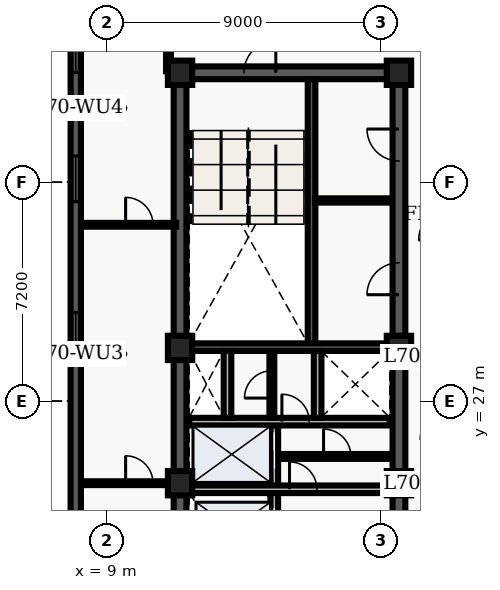
"""IFC4 building model, lengths in metres.
Left out: names, types, materials, properties, quantities, classifications, styles, units other than length and angle.
Written with IfcOpenShell. Run it as: python <this file> out.ifc"""

import sys

from ifc_helpers import new_model, entity, si_unit, converted_unit, direction, frame, origin_with_axes, origin_2d_with_axis, place, context, subcontext, project, spatial, polyline, rectangle, outline, extrude, element, fill, save


model = new_model("IFC4")
c1 = context("Model", 3, precision=1e-05, world=origin_with_axes(), true_north=direction((0.0, 1.0)))
c2 = subcontext(c1, "Body", "Model", "MODEL_VIEW")
j1 = project(units=[si_unit("LENGTHUNIT", "METRE"), converted_unit("PLANEANGLEUNIT", "DEGREE", entity("IfcPlaneAngleMeasure", 0.017), si_unit("PLANEANGLEUNIT", "RADIAN"), dimensions=[0, 0, 0, 0, 0, 0, 0])], contexts=[c1])
p1 = place(None, origin_with_axes())
s1 = spatial("IfcSite", under=j1, at=p1, CompositionType="ELEMENT")
p2 = place(p1, origin_with_axes())
s2 = spatial("IfcBuilding", under=s1, at=p2, CompositionType="ELEMENT")
p3 = place(p2, frame((0.0, 0.0, 284.1), z_axis=(0.0, 0.0, 1.0), x_axis=(1.0, 0.0, 0.0)))
s3 = spatial("IfcBuildingStorey", under=s2, at=p3, CompositionType="ELEMENT", Elevation=284.1)
p4 = place(p3, frame((11.4, 10.8, 0.0), z_axis=(0.0, 0.0, 1.0), x_axis=(0.0, 1.0, 0.0)))
e1 = element("IfcWall", 1, at=p4, inside=s3, PredefinedType="SHEAR", context=c2, shape_type="SweptSolid", body=[
    extrude(outline(polyline([(0.0, -0.21), (27.0, -0.21), (27.0, 0.21), (0.0, 0.21), (0.0, -0.21)])), origin_with_axes(), (0.0, 0.0, 1.0), 3.6),
])
p5 = place(p3, frame((11.4, 37.8, 0.0), z_axis=(0.0, 0.0, 1.0), x_axis=(1.0, 0.0, 0.0)))
e2 = element("IfcWall", 2, at=p5, inside=s3, PredefinedType="SHEAR", context=c2, shape_type="SweptSolid", body=[
    extrude(outline(polyline([(0.0, -0.21), (7.2, -0.21), (7.2, 0.21), (0.0, 0.21), (0.0, -0.21)])), origin_with_axes(), (0.0, 0.0, 1.0), 3.6),
])
p6 = place(p5, frame((2.625, 0.0, 0.0), z_axis=(0.0, 0.0, 1.0), x_axis=(1.0, 0.0, 0.0)))
e3 = element("IfcOpeningElement", 3, at=p6, cuts=e2, PredefinedType="OPENING", context=c2, shape_type="SweptSolid", body=[
    extrude(rectangle(XDim=1.05, YDim=0.44, at=origin_2d_with_axis()), origin_with_axes(), (0.0, 0.0, 1.0), 2.15),
])
p7 = place(p3, frame((18.6, 10.8, 0.0), z_axis=(0.0, 0.0, 1.0), x_axis=(0.0, 1.0, 0.0)))
e4 = element("IfcWall", 4, at=p7, inside=s3, PredefinedType="SHEAR", context=c2, shape_type="SweptSolid", body=[
    extrude(outline(polyline([(0.0, -0.21), (13.5, -0.21), (13.5, 0.21), (0.0, 0.21), (0.0, -0.21)])), origin_with_axes(), (0.0, 0.0, 1.0), 3.6),
])
p8 = place(p7, frame((1.3, 0.0, 0.0), z_axis=(0.0, 0.0, 1.0), x_axis=(1.0, 0.0, 0.0)))
e5 = element("IfcOpeningElement", 5, at=p8, cuts=e4, PredefinedType="OPENING", context=c2, shape_type="SweptSolid", body=[
    extrude(rectangle(XDim=1.1, YDim=0.44, at=origin_2d_with_axis()), origin_with_axes(), (0.0, 0.0, 1.0), 2.15),
])
p9 = place(p7, frame((3.4, 0.0, 0.0), z_axis=(0.0, 0.0, 1.0), x_axis=(1.0, 0.0, 0.0)))
e6 = element("IfcOpeningElement", 6, at=p9, cuts=e4, PredefinedType="OPENING", context=c2, shape_type="SweptSolid", body=[
    extrude(rectangle(XDim=1.1, YDim=0.44, at=origin_2d_with_axis()), origin_with_axes(), (0.0, 0.0, 1.0), 2.15),
])
p10 = place(p7, frame((11.125, 0.0, 0.0), z_axis=(0.0, 0.0, 1.0), x_axis=(1.0, 0.0, 0.0)))
e7 = element("IfcOpeningElement", 7, at=p10, cuts=e4, PredefinedType="OPENING", context=c2, shape_type="SweptSolid", body=[
    extrude(rectangle(XDim=1.05, YDim=0.44, at=origin_2d_with_axis()), origin_with_axes(), (0.0, 0.0, 1.0), 2.15),
])
p11 = place(p7, frame((6.675, 0.0, 0.0), z_axis=(0.0, 0.0, 1.0), x_axis=(1.0, 0.0, 0.0)))
e8 = element("IfcOpeningElement", 8, at=p11, cuts=e4, PredefinedType="OPENING", context=c2, shape_type="SweptSolid", body=[
    extrude(rectangle(XDim=0.95, YDim=0.44, at=origin_2d_with_axis()), origin_with_axes(), (0.0, 0.0, 1.0), 2.15),
])
p12 = place(p3, frame((18.6, 24.3, 0.0), z_axis=(0.0, 0.0, 1.0), x_axis=(0.0, 1.0, 0.0)))
e9 = element("IfcWall", 9, at=p12, inside=s3, PredefinedType="SHEAR", context=c2, shape_type="SweptSolid", body=[
    extrude(outline(polyline([(0.0, -0.21), (13.5, -0.21), (13.5, 0.21), (0.0, 0.21), (0.0, -0.21)])), origin_with_axes(), (0.0, 0.0, 1.0), 3.6),
])
p13 = place(p12, frame((6.725, 0.0, 0.0), z_axis=(0.0, 0.0, 1.0), x_axis=(1.0, 0.0, 0.0)))
e10 = element("IfcOpeningElement", 10, at=p13, cuts=e9, PredefinedType="OPENING", context=c2, shape_type="SweptSolid", body=[
    extrude(rectangle(XDim=1.05, YDim=0.44, at=origin_2d_with_axis()), origin_with_axes(), (0.0, 0.0, 1.0), 2.15),
])
p14 = place(p12, frame((11.125, 0.0, 0.0), z_axis=(0.0, 0.0, 1.0), x_axis=(1.0, 0.0, 0.0)))
e11 = element("IfcOpeningElement", 11, at=p14, cuts=e9, PredefinedType="OPENING", context=c2, shape_type="SweptSolid", body=[
    extrude(rectangle(XDim=1.05, YDim=0.44, at=origin_2d_with_axis()), origin_with_axes(), (0.0, 0.0, 1.0), 2.15),
])
p15 = place(p3, frame((15.725, 28.9, 0.0), z_axis=(0.0, 0.0, 1.0), x_axis=(0.0, 1.0, 0.0)))
e12 = element("IfcWall", 12, at=p15, inside=s3, PredefinedType="SHEAR", context=c2, shape_type="SweptSolid", body=[
    extrude(outline(polyline([(0.0, -0.125), (8.69, -0.125), (8.69, 0.125), (0.0, 0.125), (0.0, -0.125)])), origin_with_axes(), (0.0, 0.0, 1.0), 3.6),
])
p16 = place(p3, frame((11.61, 28.775, 0.0), z_axis=(0.0, 0.0, 1.0), x_axis=(1.0, 0.0, 0.0)))
e13 = element("IfcWall", 13, at=p16, inside=s3, PredefinedType="SHEAR", context=c2, shape_type="SweptSolid", body=[
    extrude(outline(polyline([(0.0, -0.125), (6.78, -0.125), (6.78, 0.125), (0.0, 0.125), (0.0, -0.125)])), origin_with_axes(), (0.0, 0.0, 1.0), 3.6),
])
p17 = place(p3, frame((14.5, 19.95, 0.0), z_axis=(0.0, 0.0, 1.0), x_axis=(0.0, 1.0, 0.0)))
e14 = element("IfcWall", 14, at=p17, inside=s3, PredefinedType="SOLIDWALL", context=c2, shape_type="SweptSolid", body=[
    extrude(outline(polyline([(0.0, -0.125), (6.25, -0.125), (6.25, 0.125), (0.0, 0.125), (0.0, -0.125)])), origin_with_axes(), (0.0, 0.0, 1.0), 2.64),
])
p18 = place(p17, frame((1.025, 0.0, 0.0), z_axis=(0.0, 0.0, 1.0), x_axis=(1.0, 0.0, 0.0)))
e15 = element("IfcOpeningElement", 15, at=p18, cuts=e14, PredefinedType="OPENING", context=c2, shape_type="SweptSolid", body=[
    extrude(rectangle(XDim=1.1, YDim=0.27, at=origin_2d_with_axis()), origin_with_axes(), (0.0, 0.0, 1.0), 2.15),
])
p19 = place(p17, frame((2.975, 0.0, 0.0), z_axis=(0.0, 0.0, 1.0), x_axis=(1.0, 0.0, 0.0)))
e16 = element("IfcOpeningElement", 16, at=p19, cuts=e14, PredefinedType="OPENING", context=c2, shape_type="SweptSolid", body=[
    extrude(rectangle(XDim=1.1, YDim=0.27, at=origin_2d_with_axis()), origin_with_axes(), (0.0, 0.0, 1.0), 2.15),
])
p20 = place(p17, frame((5.425, 0.0, 0.0), z_axis=(0.0, 0.0, 1.0), x_axis=(1.0, 0.0, 0.0)))
e17 = element("IfcOpeningElement", 17, at=p20, cuts=e14, PredefinedType="OPENING", context=c2, shape_type="SweptSolid", body=[
    extrude(rectangle(XDim=1.2, YDim=0.27, at=origin_2d_with_axis()), origin_with_axes(), (0.0, 0.0, 1.0), 2.15),
])
p21 = place(p3, frame((11.7, 24.1, 0.0), z_axis=(0.0, 0.0, 1.0), x_axis=(1.0, 0.0, 0.0)))
e18 = element("IfcWall", 18, at=p21, inside=s3, PredefinedType="SOLIDWALL", context=c2, shape_type="SweptSolid", body=[
    extrude(outline(polyline([(0.0, -0.125), (6.6, -0.125), (6.6, 0.125), (0.0, 0.125), (0.0, -0.125)])), origin_with_axes(), (0.0, 0.0, 1.0), 2.64),
])
p22 = place(p21, frame((3.75, 0.0, 0.0), z_axis=(0.0, 0.0, 1.0), x_axis=(1.0, 0.0, 0.0)))
e19 = element("IfcOpeningElement", 19, at=p22, cuts=e18, PredefinedType="OPENING", context=c2, shape_type="SweptSolid", body=[
    extrude(rectangle(XDim=0.9, YDim=0.27, at=origin_2d_with_axis()), origin_with_axes(), (0.0, 0.0, 1.0), 2.15),
])
p23 = place(p3, frame((11.7, 26.325, 0.0), z_axis=(0.0, 0.0, 1.0), x_axis=(1.0, 0.0, 0.0)))
e20 = element("IfcWall", 20, at=p23, inside=s3, PredefinedType="SOLIDWALL", context=c2, shape_type="SweptSolid", body=[
    extrude(outline(polyline([(0.0, -0.125), (6.6, -0.125), (6.6, 0.125), (0.0, 0.125), (0.0, -0.125)])), origin_with_axes(), (0.0, 0.0, 1.0), 2.64),
])
p24 = place(p23, frame((3.5, 0.0, 0.0), z_axis=(0.0, 0.0, 1.0), x_axis=(1.0, 0.0, 0.0)))
e21 = element("IfcOpeningElement", 21, at=p24, cuts=e20, PredefinedType="OPENING", context=c2, shape_type="SweptSolid", body=[
    extrude(rectangle(XDim=0.9, YDim=0.27, at=origin_2d_with_axis()), origin_with_axes(), (0.0, 0.0, 1.0), 2.15),
])
for number, where, z_axis, x_axis in (
    (22, (12.96, 26.45, 0.0), (0.0, 0.0, 1.0), (0.0, 1.0, 0.0)),
    (23, (15.925, 26.45, 0.0), (0.0, 0.0, 1.0), (0.0, 1.0, 0.0)),
):
    element("IfcWall", number, at=place(p3, frame(where, z_axis=z_axis, x_axis=x_axis)), inside=s3, PredefinedType="SOLIDWALL", context=c2, shape_type="SweptSolid", body=[
        extrude(outline(polyline([(0.0, -0.125), (2.2, -0.125), (2.2, 0.125), (0.0, 0.125), (0.0, -0.125)])), origin_with_axes(), (0.0, 0.0, 1.0), 2.64),
    ])
for number, where, z_axis, x_axis in (
    (24, (11.4, 24.3, 0.0), (0.0, 0.0, 1.0), (1.0, 0.0, 0.0)),
    (25, (11.4, 28.75, 0.0), (0.0, 0.0, 1.0), (1.0, 0.0, 0.0)),
    (26, (11.4, 37.8, 0.0), (0.0, 0.0, 1.0), (1.0, 0.0, 0.0)),
    (27, (18.6, 24.3, 0.0), (0.0, 0.0, 1.0), (1.0, 0.0, 0.0)),
    (28, (18.6, 28.75, 0.0), (0.0, 0.0, 1.0), (1.0, 0.0, 0.0)),
    (29, (18.6, 37.8, 0.0), (0.0, 0.0, 1.0), (1.0, 0.0, 0.0)),
):
    element("IfcColumn", number, at=place(p3, frame(where, z_axis=z_axis, x_axis=x_axis)), inside=s3, PredefinedType="COLUMN", context=c2, shape_type="SweptSolid", body=[
        extrude(rectangle(XDim=0.8, YDim=0.8, at=origin_2d_with_axis()), origin_with_axes(), (0.0, 0.0, 1.0), 3.9),
    ])
p25 = place(p3, frame((14.62, 25.18, 0.0), z_axis=(0.0, 0.0, 1.0), x_axis=(1.0, 0.0, 0.0)))
e30 = element("IfcWall", 30, at=p25, inside=s3, PredefinedType="PARTITIONING", context=c2, shape_type="SweptSolid", body=[
    extrude(outline(polyline([(0.0, -0.08), (3.68, -0.08), (3.68, 0.08), (0.0, 0.08), (0.0, -0.08)])), origin_with_axes(), (0.0, 0.0, 1.0), 2.64),
])
p26 = place(p25, frame((1.95, 0.0, 0.0), z_axis=(0.0, 0.0, 1.0), x_axis=(1.0, 0.0, 0.0)))
e31 = element("IfcOpeningElement", 31, at=p26, cuts=e30, PredefinedType="OPENING", context=c2, shape_type="SweptSolid", body=[
    extrude(rectangle(XDim=0.9, YDim=0.18, at=origin_2d_with_axis()), origin_with_axes(), (0.0, 0.0, 1.0), 2.15),
])
p27 = place(p3, frame((14.42, 26.45, 0.0), z_axis=(0.0, 0.0, 1.0), x_axis=(0.0, 1.0, 0.0)))
e32 = element("IfcWall", 32, at=p27, inside=s3, PredefinedType="PARTITIONING", context=c2, shape_type="SweptSolid", body=[
    extrude(outline(polyline([(0.0, -0.08), (2.2, -0.08), (2.2, 0.08), (0.0, 0.08), (0.0, -0.08)])), origin_with_axes(), (0.0, 0.0, 1.0), 2.64),
])
p28 = place(p27, frame((1.1, 0.0, 0.0), z_axis=(0.0, 0.0, 1.0), x_axis=(1.0, 0.0, 0.0)))
e33 = element("IfcOpeningElement", 33, at=p28, cuts=e32, PredefinedType="OPENING", context=c2, shape_type="SweptSolid", body=[
    extrude(rectangle(XDim=0.9, YDim=0.18, at=origin_2d_with_axis()), origin_with_axes(), (0.0, 0.0, 1.0), 2.15),
])
p29 = place(p3, frame((15.84, 33.6, 0.0), z_axis=(0.0, 0.0, 1.0), x_axis=(1.0, 0.0, 0.0)))
e34 = element("IfcWall", 34, at=p29, inside=s3, PredefinedType="PARTITIONING", context=c2, shape_type="SweptSolid", body=[
    extrude(outline(polyline([(0.0, -0.07), (2.46, -0.07), (2.46, 0.07), (0.0, 0.07), (0.0, -0.07)])), origin_with_axes(), (0.0, 0.0, 1.0), 2.64),
])
p30 = place(p3, frame((11.02, 37.85, 0.0), z_axis=(0.0, 0.0, 1.0), x_axis=(0.0, 1.0, 0.0)))
e35 = element("IfcWall", 35, at=p30, inside=s3, PredefinedType="PARTITIONING", context=c2, shape_type="SweptSolid", body=[
    extrude(outline(polyline([(0.0, -0.08), (2.65, -0.08), (2.65, 0.08), (0.0, 0.08), (0.0, -0.08)])), origin_with_axes(), (0.0, 0.0, 1.0), 2.64),
])
p31 = place(p30, frame((1.4, 0.0, 0.0), z_axis=(0.0, 0.0, 1.0), x_axis=(1.0, 0.0, 0.0)))
e36 = element("IfcOpeningElement", 36, at=p31, cuts=e35, PredefinedType="OPENING", context=c2, shape_type="SweptSolid", body=[
    extrude(rectangle(XDim=0.9, YDim=0.18, at=origin_2d_with_axis()), origin_with_axes(), (0.0, 0.0, 1.0), 2.15),
])
p32 = place(p3, frame((8.135, 24.3, 0.0), z_axis=(0.0, 0.0, 1.0), x_axis=(1.0, 0.0, 0.0)))
e37 = element("IfcWall", 37, at=p32, inside=s3, PredefinedType="PARTITIONING", context=c2, shape_type="SweptSolid", body=[
    extrude(outline(polyline([(0.0, -0.062), (3.135, -0.062), (3.135, 0.062), (0.0, 0.062), (0.0, -0.062)])), origin_with_axes(), (0.0, 0.0, 1.0), 2.64),
])
p33 = place(p32, frame((1.925, 0.0, 0.0), z_axis=(0.0, 0.0, 1.0), x_axis=(1.0, 0.0, 0.0)))
e38 = element("IfcOpeningElement", 38, at=p33, cuts=e37, PredefinedType="OPENING", context=c2, shape_type="SweptSolid", body=[
    extrude(rectangle(XDim=0.9, YDim=0.145, at=origin_2d_with_axis()), origin_with_axes(), (0.0, 0.0, 1.0), 2.15),
])
p34 = place(p3, frame((8.135, 32.8, 0.0), z_axis=(0.0, 0.0, 1.0), x_axis=(1.0, 0.0, 0.0)))
e39 = element("IfcWall", 39, at=p34, inside=s3, PredefinedType="PARTITIONING", context=c2, shape_type="SweptSolid", body=[
    extrude(outline(polyline([(0.0, -0.062), (3.135, -0.062), (3.135, 0.062), (0.0, 0.062), (0.0, -0.062)])), origin_with_axes(), (0.0, 0.0, 1.0), 2.64),
])
p35 = place(p34, frame((1.925, 0.0, 0.0), z_axis=(0.0, 0.0, 1.0), x_axis=(1.0, 0.0, 0.0)))
e40 = element("IfcOpeningElement", 40, at=p35, cuts=e39, PredefinedType="OPENING", context=c2, shape_type="SweptSolid", body=[
    extrude(rectangle(XDim=0.9, YDim=0.145, at=origin_2d_with_axis()), origin_with_axes(), (0.0, 0.0, 1.0), 2.15),
])
p36 = place(p3, frame((7.97, 2.74, 0.0), z_axis=(0.0, 0.0, 1.0), x_axis=(0.0, 1.0, 0.0)))
e41 = element("IfcWall", 41, at=p36, inside=s3, PredefinedType="SOLIDWALL", context=c2, shape_type="SweptSolid", body=[
    extrude(outline(polyline([(0.0, -0.17), (43.46, -0.17), (43.46, 0.17), (0.0, 0.17), (0.0, -0.17)])), origin_with_axes(), (0.0, 0.0, 1.0), 3.6),
])
p37 = place(p36, frame((2.948, 0.0, 0.45), z_axis=(0.0, 0.0, 1.0), x_axis=(1.0, 0.0, 0.0)))
e42 = element("IfcOpeningElement", 42, at=p37, cuts=e41, PredefinedType="OPENING", context=c2, shape_type="SweptSolid", body=[
    extrude(rectangle(XDim=1.5, YDim=0.36, at=origin_2d_with_axis()), origin_with_axes(), (0.0, 0.0, 1.0), 2.1),
])
p38 = place(p36, frame((7.643, 0.0, 0.45), z_axis=(0.0, 0.0, 1.0), x_axis=(1.0, 0.0, 0.0)))
e43 = element("IfcOpeningElement", 43, at=p38, cuts=e41, PredefinedType="OPENING", context=c2, shape_type="SweptSolid", body=[
    extrude(rectangle(XDim=1.5, YDim=0.36, at=origin_2d_with_axis()), origin_with_axes(), (0.0, 0.0, 1.0), 2.1),
])
p39 = place(p36, frame((17.034, 0.0, 0.45), z_axis=(0.0, 0.0, 1.0), x_axis=(1.0, 0.0, 0.0)))
e44 = element("IfcOpeningElement", 44, at=p39, cuts=e41, PredefinedType="OPENING", context=c2, shape_type="SweptSolid", body=[
    extrude(rectangle(XDim=1.5, YDim=0.36, at=origin_2d_with_axis()), origin_with_axes(), (0.0, 0.0, 1.0), 2.1),
])
p40 = place(p36, frame((26.426, 0.0, 0.45), z_axis=(0.0, 0.0, 1.0), x_axis=(1.0, 0.0, 0.0)))
e45 = element("IfcOpeningElement", 45, at=p40, cuts=e41, PredefinedType="OPENING", context=c2, shape_type="SweptSolid", body=[
    extrude(rectangle(XDim=1.5, YDim=0.36, at=origin_2d_with_axis()), origin_with_axes(), (0.0, 0.0, 1.0), 2.1),
])
p41 = place(p36, frame((31.571, 0.0, 0.45), z_axis=(0.0, 0.0, 1.0), x_axis=(1.0, 0.0, 0.0)))
e46 = element("IfcOpeningElement", 46, at=p41, cuts=e41, PredefinedType="OPENING", context=c2, shape_type="SweptSolid", body=[
    extrude(rectangle(XDim=1.5, YDim=0.36, at=origin_2d_with_axis()), origin_with_axes(), (0.0, 0.0, 1.0), 2.1),
])
p42 = place(p36, frame((35.817, 0.0, 0.45), z_axis=(0.0, 0.0, 1.0), x_axis=(1.0, 0.0, 0.0)))
e47 = element("IfcOpeningElement", 47, at=p42, cuts=e41, PredefinedType="OPENING", context=c2, shape_type="SweptSolid", body=[
    extrude(rectangle(XDim=1.5, YDim=0.36, at=origin_2d_with_axis()), origin_with_axes(), (0.0, 0.0, 1.0), 2.1),
])
p43 = place(p36, frame((40.512, 0.0, 0.45), z_axis=(0.0, 0.0, 1.0), x_axis=(1.0, 0.0, 0.0)))
e48 = element("IfcOpeningElement", 48, at=p43, cuts=e41, PredefinedType="OPENING", context=c2, shape_type="SweptSolid", body=[
    extrude(rectangle(XDim=1.5, YDim=0.36, at=origin_2d_with_axis()), origin_with_axes(), (0.0, 0.0, 1.0), 2.1),
])
p44 = place(p17, frame((2.975, 0.0, 0.0), z_axis=(0.0, 0.0, 1.0), x_axis=(1.0, 0.0, 0.0)))
e49 = element("IfcDoor", 49, at=p44, inside=s3, OperationType="SLIDING_TO_RIGHT", PredefinedType="DOOR", context=c2, shape_type="SweptSolid", body=[
    extrude(rectangle(XDim=1.1, YDim=0.09, at=origin_2d_with_axis()), origin_with_axes(), (0.0, 0.0, 1.0), 2.15),
])
fill(e16, e49)
p45 = place(p17, frame((5.425, 0.0, 0.0), z_axis=(0.0, 0.0, 1.0), x_axis=(1.0, 0.0, 0.0)))
e50 = element("IfcDoor", 50, at=p45, inside=s3, OperationType="DOUBLE_DOOR_SLIDING", PredefinedType="DOOR", context=c2, shape_type="SweptSolid", body=[
    extrude(rectangle(XDim=1.2, YDim=0.09, at=origin_2d_with_axis()), origin_with_axes(), (0.0, 0.0, 1.0), 2.15),
])
fill(e17, e50)
p46 = place(p5, frame((2.625, 0.0, 0.0), z_axis=(0.0, 0.0, 1.0), x_axis=(1.0, 0.0, 0.0)))
e51 = element("IfcDoor", 51, at=p46, inside=s3, OperationType="SINGLE_SWING_RIGHT", PredefinedType="DOOR", context=c2, shape_type="SweptSolid", body=[
    extrude(rectangle(XDim=1.05, YDim=0.09, at=origin_2d_with_axis()), origin_with_axes(), (0.0, 0.0, 1.0), 2.15),
])
fill(e3, e51)
p47 = place(p23, frame((3.5, 0.0, 0.0), z_axis=(0.0, 0.0, 1.0), x_axis=(1.0, 0.0, 0.0)))
e52 = element("IfcDoor", 52, at=p47, inside=s3, OperationType="SINGLE_SWING_LEFT", PredefinedType="DOOR", context=c2, shape_type="SweptSolid", body=[
    extrude(rectangle(XDim=0.9, YDim=0.09, at=origin_2d_with_axis()), origin_with_axes(), (0.0, 0.0, 1.0), 2.15),
])
fill(e21, e52)
p48 = place(p27, frame((1.1, 0.0, 0.0), z_axis=(0.0, 0.0, 1.0), x_axis=(1.0, 0.0, 0.0)))
e53 = element("IfcDoor", 53, at=p48, inside=s3, OperationType="SINGLE_SWING_LEFT", PredefinedType="DOOR", context=c2, shape_type="SweptSolid", body=[
    extrude(rectangle(XDim=0.9, YDim=0.09, at=origin_2d_with_axis()), origin_with_axes(), (0.0, 0.0, 1.0), 2.15),
])
fill(e33, e53)
p49 = place(p21, frame((3.75, 0.0, 0.0), z_axis=(0.0, 0.0, 1.0), x_axis=(1.0, 0.0, 0.0)))
e54 = element("IfcDoor", 54, at=p49, inside=s3, OperationType="SINGLE_SWING_LEFT", PredefinedType="DOOR", context=c2, shape_type="SweptSolid", body=[
    extrude(rectangle(XDim=0.9, YDim=0.09, at=origin_2d_with_axis()), origin_with_axes(), (0.0, 0.0, 1.0), 2.15),
])
fill(e19, e54)
p50 = place(p25, frame((1.95, 0.0, 0.0), z_axis=(0.0, 0.0, 1.0), x_axis=(1.0, 0.0, 0.0)))
e55 = element("IfcDoor", 55, at=p50, inside=s3, OperationType="SINGLE_SWING_LEFT", PredefinedType="DOOR", context=c2, shape_type="SweptSolid", body=[
    extrude(rectangle(XDim=0.9, YDim=0.09, at=origin_2d_with_axis()), origin_with_axes(), (0.0, 0.0, 1.0), 2.15),
])
fill(e31, e55)
p51 = place(p12, frame((6.725, 0.0, 0.0), z_axis=(0.0, 0.0, 1.0), x_axis=(1.0, 0.0, 0.0)))
e56 = element("IfcDoor", 56, at=p51, inside=s3, OperationType="SINGLE_SWING_LEFT", PredefinedType="DOOR", context=c2, shape_type="SweptSolid", body=[
    extrude(rectangle(XDim=1.05, YDim=0.09, at=origin_2d_with_axis()), origin_with_axes(), (0.0, 0.0, 1.0), 2.15),
])
fill(e10, e56)
p52 = place(p12, frame((11.125, 0.0, 0.0), z_axis=(0.0, 0.0, 1.0), x_axis=(1.0, 0.0, 0.0)))
e57 = element("IfcDoor", 57, at=p52, inside=s3, OperationType="SINGLE_SWING_RIGHT", PredefinedType="DOOR", context=c2, shape_type="SweptSolid", body=[
    extrude(rectangle(XDim=1.05, YDim=0.09, at=origin_2d_with_axis()), origin_with_axes(), (0.0, 0.0, 1.0), 2.15),
])
fill(e11, e57)
p53 = place(p32, frame((1.925, 0.0, 0.0), z_axis=(0.0, 0.0, 1.0), x_axis=(1.0, 0.0, 0.0)))
e58 = element("IfcDoor", 58, at=p53, inside=s3, OperationType="SINGLE_SWING_LEFT", PredefinedType="DOOR", context=c2, shape_type="SweptSolid", body=[
    extrude(rectangle(XDim=0.9, YDim=0.075, at=origin_2d_with_axis()), origin_with_axes(), (0.0, 0.0, 1.0), 2.15),
])
fill(e38, e58)
p54 = place(p34, frame((1.925, 0.0, 0.0), z_axis=(0.0, 0.0, 1.0), x_axis=(1.0, 0.0, 0.0)))
e59 = element("IfcDoor", 59, at=p54, inside=s3, OperationType="SINGLE_SWING_LEFT", PredefinedType="DOOR", context=c2, shape_type="SweptSolid", body=[
    extrude(rectangle(XDim=0.9, YDim=0.075, at=origin_2d_with_axis()), origin_with_axes(), (0.0, 0.0, 1.0), 2.15),
])
fill(e40, e59)
p55 = place(p36, frame((26.426, 0.0, 0.45), z_axis=(0.0, 0.0, 1.0), x_axis=(1.0, 0.0, 0.0)))
e60 = element("IfcWindow", 60, at=p55, inside=s3, PredefinedType="WINDOW", context=c2, shape_type="SweptSolid", body=[
    extrude(rectangle(XDim=1.5, YDim=0.09, at=origin_2d_with_axis()), origin_with_axes(), (0.0, 0.0, 1.0), 2.1),
])
fill(e45, e60)
p56 = place(p36, frame((31.571, 0.0, 0.45), z_axis=(0.0, 0.0, 1.0), x_axis=(1.0, 0.0, 0.0)))
e61 = element("IfcWindow", 61, at=p56, inside=s3, PredefinedType="WINDOW", context=c2, shape_type="SweptSolid", body=[
    extrude(rectangle(XDim=1.5, YDim=0.09, at=origin_2d_with_axis()), origin_with_axes(), (0.0, 0.0, 1.0), 2.1),
])
fill(e46, e61)
p57 = place(p36, frame((35.817, 0.0, 0.45), z_axis=(0.0, 0.0, 1.0), x_axis=(1.0, 0.0, 0.0)))
e62 = element("IfcWindow", 62, at=p57, inside=s3, PredefinedType="WINDOW", context=c2, shape_type="SweptSolid", body=[
    extrude(rectangle(XDim=1.5, YDim=0.09, at=origin_2d_with_axis()), origin_with_axes(), (0.0, 0.0, 1.0), 2.1),
])
fill(e47, e62)
save(model, sys.argv[1])
